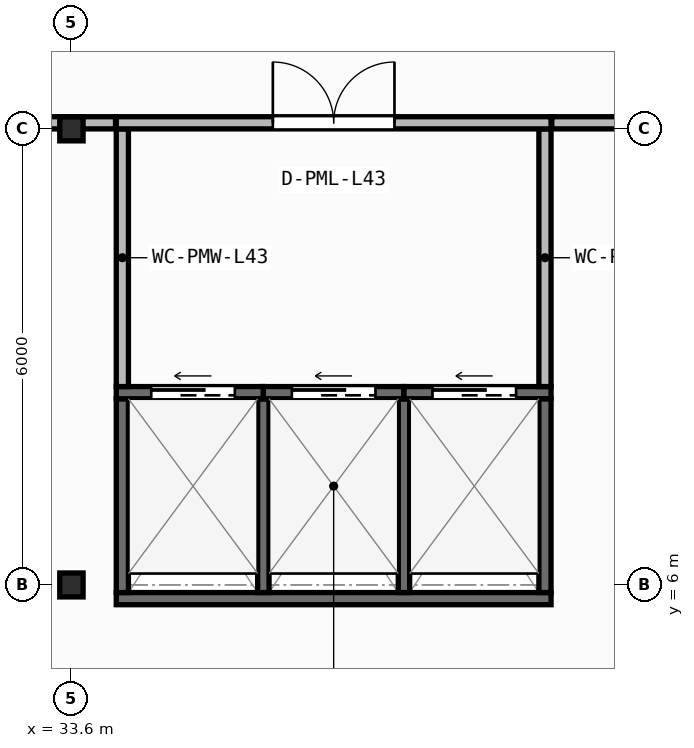
"""IFC4 building model, lengths in metres.
Left out: names, types, materials, properties, quantities, classifications, styles, units other than length and angle.
Written with IfcOpenShell. Run it as: python <this file> out.ifc"""

import sys

from ifc_helpers import new_model, si_unit, direction, frame, frame_2d, origin, origin_2d, place, context, subcontext, project, spatial, rectangle, i_section, extrude, element, fill, save


model = new_model("IFC4")
c1 = context("Model", 3, precision=1e-05, world=origin(), true_north=direction((0.0, 1.0)))
c2 = subcontext(c1, "Body", "Model", "MODEL_VIEW")
j1 = project(units=[si_unit("LENGTHUNIT", "METRE"), si_unit("PLANEANGLEUNIT", "RADIAN")], contexts=[c1])
p1 = place(None, origin())
s1 = spatial("IfcSite", under=j1, at=p1, CompositionType="ELEMENT")
p2 = place(p1, origin())
s2 = spatial("IfcBuilding", under=s1, at=p2, CompositionType="ELEMENT")
p3 = place(p2, frame((0.0, 0.0, 174.45)))
s3 = spatial("IfcBuildingStorey", under=s2, at=p3, CompositionType="ELEMENT", Elevation=174.45)
for number, where, z_axis, x_axis in (
    (1, (33.6, 6.0, 0.0), (0.0, 0.0, 1.0), (1.0, 0.0, 0.0)),
    (2, (33.6, 12.0, 0.0), (0.0, 0.0, 1.0), (1.0, 0.0, 0.0)),
):
    element("IfcColumn", number, at=place(p3, frame(where, z_axis=z_axis, x_axis=x_axis)), inside=s3, PredefinedType="COLUMN", context=c2, shape_type="SweptSolid", body=[
        extrude(i_section(OverallWidth=0.307, OverallDepth=0.315, WebThickness=0.012, FlangeThickness=0.019, FilletRadius=0.017, at=origin_2d()), origin(), (0.0, 0.0, 1.0), 5.8),
    ])
p4 = place(p3, frame((34.19, 5.82, 0.0), z_axis=(0.0, 0.0, 1.0), x_axis=(1.0, 0.0, 0.0)))
e3 = element("IfcWall", 3, at=p4, inside=s3, PredefinedType="SHEAR", context=c2, shape_type="SweptSolid", body=[
    extrude(rectangle(XDim=5.72, YDim=0.16, at=frame_2d((2.86, 0.0))), origin(), (0.0, 0.0, 1.0), 5.56),
])
for number, where, z_axis, x_axis in (
    (4, (34.27, 5.9, 0.0), (0.0, 0.0, 1.0), (0.0, 1.0, 0.0)),
    (5, (39.83, 5.9, 0.0), (0.0, 0.0, 1.0), (0.0, 1.0, 0.0)),
):
    element("IfcWall", number, at=place(p3, frame(where, z_axis=z_axis, x_axis=x_axis)), inside=s3, PredefinedType="SHEAR", context=c2, shape_type="SweptSolid", body=[
        extrude(rectangle(XDim=2.55, YDim=0.16, at=frame_2d((1.275, 0.0))), origin(), (0.0, 0.0, 1.0), 5.56),
    ])
for number, where, z_axis, x_axis in (
    (6, (36.125, 5.9, 0.0), (0.0, 0.0, 1.0), (0.0, 1.0, 0.0)),
    (7, (37.975, 5.9, 0.0), (0.0, 0.0, 1.0), (0.0, 1.0, 0.0)),
):
    element("IfcWall", number, at=place(p3, frame(where, z_axis=z_axis, x_axis=x_axis)), inside=s3, PredefinedType="SHEAR", context=c2, shape_type="SweptSolid", body=[
        extrude(rectangle(XDim=2.55, YDim=0.15, at=frame_2d((1.275, 0.0))), origin(), (0.0, 0.0, 1.0), 5.56),
    ])
p5 = place(p3, frame((34.19, 8.53, 0.0), z_axis=(0.0, 0.0, 1.0), x_axis=(1.0, 0.0, 0.0)))
e8 = element("IfcWall", 8, at=p5, inside=s3, PredefinedType="SHEAR", context=c2, shape_type="SweptSolid", body=[
    extrude(rectangle(XDim=1.935, YDim=0.16, at=frame_2d((0.968, 0.0))), origin(), (0.0, 0.0, 1.0), 5.56),
])
p6 = place(p5, frame((0.46, 0.0, 0.0)))
e9 = element("IfcOpeningElement", 9, at=p6, cuts=e8, PredefinedType="OPENING", context=c2, shape_type="SweptSolid", body=[
    extrude(rectangle(XDim=1.1, YDim=2.15, at=frame_2d((0.55, 1.075))), frame((0.0, 0.09, 0.0), z_axis=(0.0, -1.0, 0.0), x_axis=(1.0, 0.0, 0.0)), (0.0, 0.0, 1.0), 0.18),
])
p7 = place(p3, frame((36.125, 8.53, 0.0), z_axis=(0.0, 0.0, 1.0), x_axis=(1.0, 0.0, 0.0)))
e10 = element("IfcWall", 10, at=p7, inside=s3, PredefinedType="SHEAR", context=c2, shape_type="SweptSolid", body=[
    extrude(rectangle(XDim=1.85, YDim=0.16, at=frame_2d((0.925, 0.0))), origin(), (0.0, 0.0, 1.0), 5.56),
])
p8 = place(p7, frame((0.375, 0.0, 0.0)))
e11 = element("IfcOpeningElement", 11, at=p8, cuts=e10, PredefinedType="OPENING", context=c2, shape_type="SweptSolid", body=[
    extrude(rectangle(XDim=1.1, YDim=2.15, at=frame_2d((0.55, 1.075))), frame((0.0, 0.09, 0.0), z_axis=(0.0, -1.0, 0.0), x_axis=(1.0, 0.0, 0.0)), (0.0, 0.0, 1.0), 0.18),
])
p9 = place(p3, frame((37.975, 8.53, 0.0), z_axis=(0.0, 0.0, 1.0), x_axis=(1.0, 0.0, 0.0)))
e12 = element("IfcWall", 12, at=p9, inside=s3, PredefinedType="SHEAR", context=c2, shape_type="SweptSolid", body=[
    extrude(rectangle(XDim=1.935, YDim=0.16, at=frame_2d((0.967, 0.0))), origin(), (0.0, 0.0, 1.0), 5.56),
])
p10 = place(p9, frame((0.375, 0.0, 0.0)))
e13 = element("IfcOpeningElement", 13, at=p10, cuts=e12, PredefinedType="OPENING", context=c2, shape_type="SweptSolid", body=[
    extrude(rectangle(XDim=1.1, YDim=2.15, at=frame_2d((0.55, 1.075))), frame((0.0, 0.09, 0.0), z_axis=(0.0, -1.0, 0.0), x_axis=(1.0, 0.0, 0.0)), (0.0, 0.0, 1.0), 0.18),
])
for number, where, z_axis, x_axis in (
    (14, (34.27, 8.61, 0.0), (0.0, 0.0, 1.0), (0.0, 1.0, 0.0)),
    (15, (39.83, 8.61, 0.0), (0.0, 0.0, 1.0), (0.0, 1.0, 0.0)),
):
    element("IfcWall", number, at=place(p3, frame(where, z_axis=z_axis, x_axis=x_axis)), inside=s3, PredefinedType="PARTITIONING", context=c2, shape_type="SweptSolid", body=[
        extrude(rectangle(XDim=3.39, YDim=0.16, at=frame_2d((1.695, 0.0))), origin(), (0.0, 0.0, 1.0), 5.56),
    ])
p11 = place(p3, frame((34.19, 12.08, 0.0), z_axis=(0.0, 0.0, 1.0), x_axis=(1.0, 0.0, 0.0)))
e16 = element("IfcWall", 16, at=p11, inside=s3, PredefinedType="PARTITIONING", context=c2, shape_type="SweptSolid", body=[
    extrude(rectangle(XDim=5.72, YDim=0.16, at=frame_2d((2.86, 0.0))), origin(), (0.0, 0.0, 1.0), 4.835),
])
p12 = place(p11, frame((2.06, 0.0, 0.0)))
e17 = element("IfcOpeningElement", 17, at=p12, cuts=e16, PredefinedType="OPENING", context=c2, shape_type="SweptSolid", body=[
    extrude(rectangle(XDim=1.6, YDim=2.05, at=frame_2d((0.8, 1.025))), frame((0.0, 0.09, 0.0), z_axis=(0.0, -1.0, 0.0), x_axis=(1.0, 0.0, 0.0)), (0.0, 0.0, 1.0), 0.18),
])
p13 = place(p3, frame((23.92, 12.08, 0.0), z_axis=(0.0, 0.0, 1.0), x_axis=(1.0, 0.0, 0.0)))
e18 = element("IfcWall", 18, at=p13, inside=s3, PredefinedType="PARTITIONING", context=c2, shape_type="SweptSolid", body=[
    extrude(rectangle(XDim=10.26, YDim=0.16, at=frame_2d((5.13, 0.0))), origin(), (0.0, 0.0, 1.0), 4.835),
])
p14 = place(p3, frame((39.92, 12.08, 0.0), z_axis=(0.0, 0.0, 1.0), x_axis=(1.0, 0.0, 0.0)))
e19 = element("IfcWall", 19, at=p14, inside=s3, PredefinedType="PARTITIONING", context=c2, shape_type="SweptSolid", body=[
    extrude(rectangle(XDim=8.56, YDim=0.16, at=frame_2d((4.28, 0.0))), origin(), (0.0, 0.0, 1.0), 4.835),
])
p15 = place(p6, origin())
e20 = element("IfcDoor", 20, at=p15, inside=s3, OperationType="SLIDING_TO_LEFT", PredefinedType="DOOR", context=c2, shape_type="SweptSolid", body=[
    extrude(rectangle(XDim=1.1, YDim=2.15, at=frame_2d((0.55, 1.075))), frame((0.0, 0.025, 0.0), z_axis=(0.0, -1.0, 0.0), x_axis=(1.0, 0.0, 0.0)), (0.0, 0.0, 1.0), 0.05),
])
fill(e9, e20)
p16 = place(p8, origin())
e21 = element("IfcDoor", 21, at=p16, inside=s3, OperationType="SLIDING_TO_LEFT", PredefinedType="DOOR", context=c2, shape_type="SweptSolid", body=[
    extrude(rectangle(XDim=1.1, YDim=2.15, at=frame_2d((0.55, 1.075))), frame((0.0, 0.025, 0.0), z_axis=(0.0, -1.0, 0.0), x_axis=(1.0, 0.0, 0.0)), (0.0, 0.0, 1.0), 0.05),
])
fill(e11, e21)
p17 = place(p10, origin())
e22 = element("IfcDoor", 22, at=p17, inside=s3, OperationType="SLIDING_TO_LEFT", PredefinedType="DOOR", context=c2, shape_type="SweptSolid", body=[
    extrude(rectangle(XDim=1.1, YDim=2.15, at=frame_2d((0.55, 1.075))), frame((0.0, 0.025, 0.0), z_axis=(0.0, -1.0, 0.0), x_axis=(1.0, 0.0, 0.0)), (0.0, 0.0, 1.0), 0.05),
])
fill(e13, e22)
p18 = place(p12, origin())
e23 = element("IfcDoor", 23, at=p18, inside=s3, OperationType="DOUBLE_DOOR_SINGLE_SWING", PredefinedType="DOOR", context=c2, shape_type="SweptSolid", body=[
    extrude(rectangle(XDim=1.6, YDim=2.05, at=frame_2d((0.8, 1.025))), frame((0.0, 0.025, 0.0), z_axis=(0.0, -1.0, 0.0), x_axis=(1.0, 0.0, 0.0)), (0.0, 0.0, 1.0), 0.05),
])
fill(e17, e23)
save(model, sys.argv[1])
